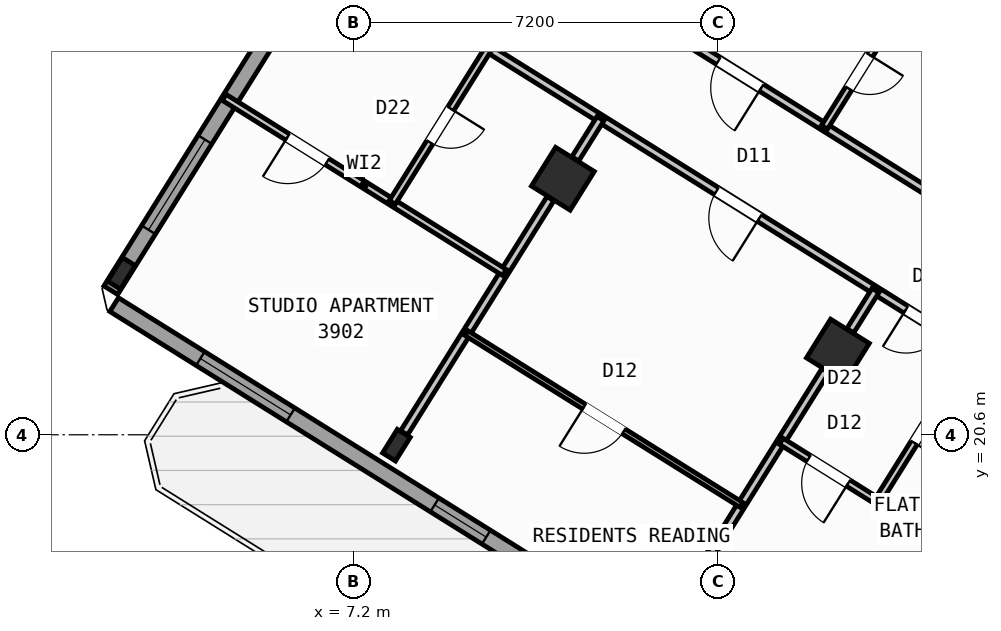
"""IFC4 building model, lengths in metres.
Left out: names, types, materials, properties, quantities, classifications, styles, units other than length and angle.
Written with IfcOpenShell. Run it as: python <this file> out.ifc"""

import sys

from ifc_helpers import new_model, si_unit, direction, frame, frame_2d, origin, origin_2d, place, context, subcontext, project, spatial, rectangle, hollow_rectangle, i_section, extrude, source, transform, mapped, element, fill, save


model = new_model("IFC4")
c1 = context("Model", 3, precision=1e-05, world=origin(), true_north=direction((0.0, 1.0)))
c2 = subcontext(c1, "Body", "Model", "MODEL_VIEW")
j1 = project(units=[si_unit("LENGTHUNIT", "METRE"), si_unit("PLANEANGLEUNIT", "RADIAN")], contexts=[c1])
p1 = place(None, origin())
s1 = spatial("IfcSite", under=j1, at=p1, CompositionType="ELEMENT")
p2 = place(p1, origin())
s2 = spatial("IfcBuilding", under=s1, at=p2, CompositionType="ELEMENT")
p3 = place(p2, frame((0.0, 0.0, 155.1)))
s3 = spatial("IfcBuildingStorey", under=s2, at=p3, CompositionType="ELEMENT", Elevation=155.1)
m1 = source(origin(), c2, "Body", "SweptSolid", [
    extrude(hollow_rectangle(XDim=0.9, YDim=0.9, WallThickness=0.036, at=origin_2d()), origin(), (0.0, 0.0, 1.0), 3.6),
])
for number, where, z_axis, x_axis in (
    (1, (16.764, 22.261, 0.0), (0.0, 0.0, 1.0), (-0.848, 0.53, 0.0)),
    (2, (11.336, 25.653, 0.0), (0.0, 0.0, 1.0), (-0.848, 0.53, 0.0)),
):
    element("IfcColumn", number, at=place(p3, frame(where, z_axis=z_axis, x_axis=x_axis)), inside=s3, PredefinedType="COLUMN", context=c2, shape_type="MappedRepresentation", body=[
        mapped(m1, transform((0.0, 0.0, 0.0), scale=1.0)),
    ])
m2 = source(origin(), c2, "Body", "SweptSolid", [
    extrude(i_section(OverallWidth=0.3, OverallDepth=0.55, WebThickness=0.015, FlangeThickness=0.029, at=origin_2d()), origin(), (0.0, 0.0, 1.0), 3.6),
])
for number, where, z_axis, x_axis in (
    (3, (8.051, 20.395, 0.0), (0.0, 0.0, 1.0), (-0.848, 0.53, 0.0)),
    (4, (2.623, 23.786, 0.0), (0.0, 0.0, 1.0), (-0.848, 0.53, 0.0)),
):
    element("IfcColumn", number, at=place(p3, frame(where, z_axis=z_axis, x_axis=x_axis)), inside=s3, PredefinedType="COLUMN", context=c2, shape_type="MappedRepresentation", body=[
        mapped(m2, transform((0.0, 0.0, 0.0), scale=1.0)),
    ])
p4 = place(p3, frame((29.268, 6.429, 0.0), z_axis=(0.0, 0.0, 1.0), x_axis=(-0.848049971435, 0.529916263149, 0.0)))
e5 = element("IfcWall", 5, at=p4, inside=s3, PredefinedType="STANDARD", context=c2, shape_type="SweptSolid", body=[
    extrude(rectangle(XDim=31.588, YDim=0.32, at=frame_2d((15.794, 0.0))), origin(), (0.0, 0.0, 1.0), 3.35),
])
p5 = place(p4, frame((16.362, 0.0, 0.0)))
e6 = element("IfcOpeningElement", 6, at=p5, cuts=e5, PredefinedType="OPENING", context=c2, shape_type="SweptSolid", body=[
    extrude(rectangle(XDim=1.2, YDim=2.15, at=frame_2d((0.6, 1.075))), frame((0.0, 0.17, 0.0), z_axis=(0.0, -1.0, 0.0), x_axis=(1.0, 0.0, 0.0)), (0.0, 0.0, 1.0), 0.34),
])
p6 = place(p4, frame((2.989, 0.0, 0.8)))
e7 = element("IfcOpeningElement", 7, at=p6, cuts=e5, PredefinedType="OPENING", context=c2, shape_type="SweptSolid", body=[
    extrude(rectangle(XDim=2.1, YDim=1.55, at=frame_2d((1.05, 0.775))), frame((0.0, 0.17, 0.0), z_axis=(0.0, -1.0, 0.0), x_axis=(1.0, 0.0, 0.0)), (0.0, 0.0, 1.0), 0.34),
])
p7 = place(p4, frame((8.359, 0.0, 0.8)))
e8 = element("IfcOpeningElement", 8, at=p7, cuts=e5, PredefinedType="OPENING", context=c2, shape_type="SweptSolid", body=[
    extrude(rectangle(XDim=2.1, YDim=1.55, at=frame_2d((1.05, 0.775))), frame((0.0, 0.17, 0.0), z_axis=(0.0, -1.0, 0.0), x_axis=(1.0, 0.0, 0.0)), (0.0, 0.0, 1.0), 0.34),
])
p8 = place(p4, frame((13.284, 0.0, 0.95)))
e9 = element("IfcOpeningElement", 9, at=p8, cuts=e5, PredefinedType="OPENING", context=c2, shape_type="SweptSolid", body=[
    extrude(rectangle(XDim=1.2, YDim=1.4, at=frame_2d((0.6, 0.7))), frame((0.0, 0.17, 0.0), z_axis=(0.0, -1.0, 0.0), x_axis=(1.0, 0.0, 0.0)), (0.0, 0.0, 1.0), 0.34),
])
p9 = place(p4, frame((20.259, 0.0, 0.95)))
e10 = element("IfcOpeningElement", 10, at=p9, cuts=e5, PredefinedType="OPENING", context=c2, shape_type="SweptSolid", body=[
    extrude(rectangle(XDim=1.2, YDim=1.4, at=frame_2d((0.6, 0.7))), frame((0.0, 0.17, 0.0), z_axis=(0.0, -1.0, 0.0), x_axis=(1.0, 0.0, 0.0)), (0.0, 0.0, 1.0), 0.34),
])
p10 = place(p4, frame((22.929, 0.0, 0.95)))
e11 = element("IfcOpeningElement", 11, at=p10, cuts=e5, PredefinedType="OPENING", context=c2, shape_type="SweptSolid", body=[
    extrude(rectangle(XDim=1.2, YDim=1.4, at=frame_2d((0.6, 0.7))), frame((0.0, 0.17, 0.0), z_axis=(0.0, -1.0, 0.0), x_axis=(1.0, 0.0, 0.0)), (0.0, 0.0, 1.0), 0.34),
])
p11 = place(p4, frame((27.481, 0.0, 0.8)))
e12 = element("IfcOpeningElement", 12, at=p11, cuts=e5, PredefinedType="OPENING", context=c2, shape_type="SweptSolid", body=[
    extrude(rectangle(XDim=2.1, YDim=1.55, at=frame_2d((1.05, 0.775))), frame((0.0, 0.17, 0.0), z_axis=(0.0, -1.0, 0.0), x_axis=(1.0, 0.0, 0.0)), (0.0, 0.0, 1.0), 0.34),
])
p12 = place(p3, frame((2.415, 23.452, 0.0), z_axis=(0.0, 0.0, 1.0), x_axis=(0.52991049553, 0.848053575387, 0.0)))
e13 = element("IfcWall", 13, at=p12, inside=s3, PredefinedType="STANDARD", context=c2, shape_type="SweptSolid", body=[
    extrude(rectangle(XDim=21.587, YDim=0.32, at=frame_2d((10.794, 0.0))), origin(), (0.0, 0.0, 1.0), 2.775),
])
p13 = place(p12, frame((1.406, 0.0, 0.8)))
e14 = element("IfcOpeningElement", 14, at=p13, cuts=e13, PredefinedType="OPENING", context=c2, shape_type="SweptSolid", body=[
    extrude(rectangle(XDim=2.1, YDim=1.55, at=frame_2d((1.05, 0.775))), frame((0.0, 0.17, 0.0), z_axis=(0.0, -1.0, 0.0), x_axis=(1.0, 0.0, 0.0)), (0.0, 0.0, 1.0), 0.34),
])
p14 = place(p12, frame((10.949, 0.0, 1.0)))
e15 = element("IfcOpeningElement", 15, at=p14, cuts=e13, PredefinedType="OPENING", context=c2, shape_type="SweptSolid", body=[
    extrude(rectangle(XDim=0.9, YDim=1.25, at=frame_2d((0.45, 0.625))), frame((0.0, 0.17, 0.0), z_axis=(0.0, -1.0, 0.0), x_axis=(1.0, 0.0, 0.0)), (0.0, 0.0, 1.0), 0.34),
])
p15 = place(p12, frame((15.369, 0.0, 0.85)))
e16 = element("IfcOpeningElement", 16, at=p15, cuts=e13, PredefinedType="OPENING", context=c2, shape_type="SweptSolid", body=[
    extrude(rectangle(XDim=1.5, YDim=1.5, at=frame_2d((0.75, 0.75))), frame((0.0, 0.17, 0.0), z_axis=(0.0, -1.0, 0.0), x_axis=(1.0, 0.0, 0.0)), (0.0, 0.0, 1.0), 0.34),
])
p16 = place(p12, frame((18.219, 0.0, 0.85)))
e17 = element("IfcOpeningElement", 17, at=p16, cuts=e13, PredefinedType="OPENING", context=c2, shape_type="SweptSolid", body=[
    extrude(rectangle(XDim=1.5, YDim=1.5, at=frame_2d((0.75, 0.75))), frame((0.0, 0.17, 0.0), z_axis=(0.0, -1.0, 0.0), x_axis=(1.0, 0.0, 0.0)), (0.0, 0.0, 1.0), 0.34),
])
p17 = place(p3, frame((14.138, 41.825, 0.0), z_axis=(0.0, 0.0, 1.0), x_axis=(0.848046498049, -0.529921821731, 0.0)))
e18 = element("IfcWall", 18, at=p17, inside=s3, PredefinedType="STANDARD", context=c2, shape_type="SweptSolid", body=[
    extrude(rectangle(XDim=31.588, YDim=0.32, at=frame_2d((15.794, 0.0))), origin(), (0.0, 0.0, 1.0), 3.35),
])
p18 = place(p17, frame((9.792, 0.0, 0.0)))
e19 = element("IfcOpeningElement", 19, at=p18, cuts=e18, PredefinedType="OPENING", context=c2, shape_type="SweptSolid", body=[
    extrude(rectangle(XDim=1.05, YDim=2.15, at=frame_2d((0.525, 1.075))), frame((0.0, 0.17, 0.0), z_axis=(0.0, -1.0, 0.0), x_axis=(1.0, 0.0, 0.0)), (0.0, 0.0, 1.0), 0.34),
])
p19 = place(p17, frame((0.791, 0.0, 0.85)))
e20 = element("IfcOpeningElement", 20, at=p19, cuts=e18, PredefinedType="OPENING", context=c2, shape_type="SweptSolid", body=[
    extrude(rectangle(XDim=1.8, YDim=1.5, at=frame_2d((0.9, 0.75))), frame((0.0, 0.17, 0.0), z_axis=(0.0, -1.0, 0.0), x_axis=(1.0, 0.0, 0.0)), (0.0, 0.0, 1.0), 0.34),
])
p20 = place(p17, frame((3.996, 0.0, 0.95)))
e21 = element("IfcOpeningElement", 21, at=p20, cuts=e18, PredefinedType="OPENING", context=c2, shape_type="SweptSolid", body=[
    extrude(rectangle(XDim=1.2, YDim=1.4, at=frame_2d((0.6, 0.7))), frame((0.0, 0.17, 0.0), z_axis=(0.0, -1.0, 0.0), x_axis=(1.0, 0.0, 0.0)), (0.0, 0.0, 1.0), 0.34),
])
p21 = place(p17, frame((13.874, 0.0, 0.85)))
e22 = element("IfcOpeningElement", 22, at=p21, cuts=e18, PredefinedType="OPENING", context=c2, shape_type="SweptSolid", body=[
    extrude(rectangle(XDim=1.5, YDim=1.5, at=frame_2d((0.75, 0.75))), frame((0.0, 0.17, 0.0), z_axis=(0.0, -1.0, 0.0), x_axis=(1.0, 0.0, 0.0)), (0.0, 0.0, 1.0), 0.34),
])
p22 = place(p17, frame((17.104, 0.0, 1.0)))
e23 = element("IfcOpeningElement", 23, at=p22, cuts=e18, PredefinedType="OPENING", context=c2, shape_type="SweptSolid", body=[
    extrude(rectangle(XDim=0.9, YDim=1.25, at=frame_2d((0.45, 0.625))), frame((0.0, 0.17, 0.0), z_axis=(0.0, -1.0, 0.0), x_axis=(1.0, 0.0, 0.0)), (0.0, 0.0, 1.0), 0.34),
])
p23 = place(p17, frame((22.069, 0.0, 1.0)))
e24 = element("IfcOpeningElement", 24, at=p23, cuts=e18, PredefinedType="OPENING", context=c2, shape_type="SweptSolid", body=[
    extrude(rectangle(XDim=0.9, YDim=1.25, at=frame_2d((0.45, 0.625))), frame((0.0, 0.17, 0.0), z_axis=(0.0, -1.0, 0.0), x_axis=(1.0, 0.0, 0.0)), (0.0, 0.0, 1.0), 0.34),
])
p24 = place(p17, frame((27.519, 0.0, 1.0)))
e25 = element("IfcOpeningElement", 25, at=p24, cuts=e18, PredefinedType="OPENING", context=c2, shape_type="SweptSolid", body=[
    extrude(rectangle(XDim=0.9, YDim=1.25, at=frame_2d((0.45, 0.625))), frame((0.0, 0.17, 0.0), z_axis=(0.0, -1.0, 0.0), x_axis=(1.0, 0.0, 0.0)), (0.0, 0.0, 1.0), 0.34),
])
p25 = place(p3, frame((20.719, 21.44, 0.0), z_axis=(0.0, 0.0, 1.0), x_axis=(-0.529906246318, -0.848056230514, 0.0)))
e26 = element("IfcWall", 26, at=p25, inside=s3, PredefinedType="PARTITIONING", context=c2, shape_type="SweptSolid", body=[
    extrude(rectangle(XDim=8.05, YDim=0.16, at=frame_2d((4.025, 0.0))), origin(), (0.0, 0.0, 1.0), 3.34),
])
p26 = place(p3, frame((21.885, 23.306, 0.0), z_axis=(0.0, 0.0, 1.0), x_axis=(-0.848052408131, 0.529912363569, 0.0)))
e27 = element("IfcWall", 27, at=p26, inside=s3, PredefinedType="PARTITIONING", context=c2, shape_type="SweptSolid", body=[
    extrude(rectangle(XDim=16.73, YDim=0.16, at=frame_2d((8.365, 0.0))), origin(), (0.0, 0.0, 1.0), 3.34),
])
p27 = place(p26, frame((1.395, 0.0, 0.0)))
e28 = element("IfcOpeningElement", 28, at=p27, cuts=e27, PredefinedType="OPENING", context=c2, shape_type="SweptSolid", body=[
    extrude(rectangle(XDim=1.0, YDim=2.1, at=frame_2d((0.5, 1.05))), frame((0.0, 0.09, 0.0), z_axis=(0.0, -1.0, 0.0), x_axis=(1.0, 0.0, 0.0)), (0.0, 0.0, 1.0), 0.18),
])
p28 = place(p26, frame((7.82, 0.0, 0.0)))
e29 = element("IfcOpeningElement", 29, at=p28, cuts=e27, PredefinedType="OPENING", context=c2, shape_type="SweptSolid", body=[
    extrude(rectangle(XDim=1.0, YDim=2.1, at=frame_2d((0.5, 1.05))), frame((0.0, 0.09, 0.0), z_axis=(0.0, -1.0, 0.0), x_axis=(1.0, 0.0, 0.0)), (0.0, 0.0, 1.0), 0.18),
])
p29 = place(p26, frame((11.14, 0.0, 0.0)))
e30 = element("IfcOpeningElement", 30, at=p29, cuts=e27, PredefinedType="OPENING", context=c2, shape_type="SweptSolid", body=[
    extrude(rectangle(XDim=1.0, YDim=2.1, at=frame_2d((0.5, 1.05))), frame((0.0, 0.09, 0.0), z_axis=(0.0, -1.0, 0.0), x_axis=(1.0, 0.0, 0.0)), (0.0, 0.0, 1.0), 0.18),
])
p30 = place(p3, frame((20.719, 21.44, 0.0), z_axis=(0.0, 0.0, 1.0), x_axis=(-0.848048310262, 0.529918921593, 0.0)))
e31 = element("IfcWall", 31, at=p30, inside=s3, PredefinedType="PARTITIONING", context=c2, shape_type="SweptSolid", body=[
    extrude(rectangle(XDim=16.73, YDim=0.16, at=frame_2d((8.365, 0.0))), origin(), (0.0, 0.0, 1.0), 3.34),
])
p31 = place(p30, frame((2.22, 0.0, 0.0)))
e32 = element("IfcOpeningElement", 32, at=p31, cuts=e31, PredefinedType="OPENING", context=c2, shape_type="SweptSolid", body=[
    extrude(rectangle(XDim=0.86, YDim=2.05, at=frame_2d((0.43, 1.025))), frame((0.0, 0.09, 0.0), z_axis=(0.0, -1.0, 0.0), x_axis=(1.0, 0.0, 0.0)), (0.0, 0.0, 1.0), 0.18),
])
p32 = place(p30, frame((6.49, 0.0, 0.0)))
e33 = element("IfcOpeningElement", 33, at=p32, cuts=e31, PredefinedType="OPENING", context=c2, shape_type="SweptSolid", body=[
    extrude(rectangle(XDim=1.0, YDim=2.1, at=frame_2d((0.5, 1.05))), frame((0.0, 0.09, 0.0), z_axis=(0.0, -1.0, 0.0), x_axis=(1.0, 0.0, 0.0)), (0.0, 0.0, 1.0), 0.18),
])
p33 = place(p30, frame((14.304, 0.0, 0.0)))
e34 = element("IfcOpeningElement", 34, at=p33, cuts=e31, PredefinedType="OPENING", context=c2, shape_type="SweptSolid", body=[
    extrude(rectangle(XDim=1.0, YDim=2.1, at=frame_2d((0.5, 1.05))), frame((0.0, 0.09, 0.0), z_axis=(0.0, -1.0, 0.0), x_axis=(1.0, 0.0, 0.0)), (0.0, 0.0, 1.0), 0.18),
])
p34 = place(p3, frame((17.506, 23.449, 0.0), z_axis=(0.0, 0.0, 1.0), x_axis=(-0.529835187763, -0.848100627171, 0.0)))
e35 = element("IfcWall", 35, at=p34, inside=s3, PredefinedType="PARTITIONING", context=c2, shape_type="SweptSolid", body=[
    extrude(rectangle(XDim=0.938, YDim=0.16, at=frame_2d((0.469, 0.0))), origin(), (0.0, 0.0, 1.0), 2.775),
])
p35 = place(p3, frame((16.519, 21.87, 0.0), z_axis=(0.0, 0.0, 1.0), x_axis=(-0.529922447305, -0.848046107144, 0.0)))
e36 = element("IfcWall", 36, at=p35, inside=s3, PredefinedType="PARTITIONING", context=c2, shape_type="SweptSolid", body=[
    extrude(rectangle(XDim=5.451, YDim=0.16, at=frame_2d((2.726, 0.0))), origin(), (0.0, 0.0, 1.0), 2.775),
])
p36 = place(p3, frame((18.86, 18.464, 0.0), z_axis=(0.0, 0.0, 1.0), x_axis=(-0.848059820872, 0.529900500304, 0.0)))
e37 = element("IfcWall", 37, at=p36, inside=s3, PredefinedType="PLUMBINGWALL", context=c2, shape_type="SweptSolid", body=[
    extrude(rectangle(XDim=3.79, YDim=0.14, at=frame_2d((1.895, 0.0))), origin(), (0.0, 0.0, 1.0), 3.34),
])
p37 = place(p36, frame((2.23, 0.0, 0.0)))
e38 = element("IfcOpeningElement", 38, at=p37, cuts=e37, PredefinedType="OPENING", context=c2, shape_type="SweptSolid", body=[
    extrude(rectangle(XDim=0.92, YDim=2.08, at=frame_2d((0.46, 1.04))), frame((0.0, 0.08, 0.0), z_axis=(0.0, -1.0, 0.0), x_axis=(1.0, 0.0, 0.0)), (0.0, 0.0, 1.0), 0.16),
])
p38 = place(p3, frame((19.405, 22.261, 0.0), z_axis=(0.0, 0.0, 1.0), x_axis=(-0.529898896701, -0.848060822863, 0.0)))
e39 = element("IfcWall", 39, at=p38, inside=s3, PredefinedType="PLUMBINGWALL", context=c2, shape_type="SweptSolid", body=[
    extrude(rectangle(XDim=3.51, YDim=0.14, at=frame_2d((1.755, 0.0))), origin(), (0.0, 0.0, 1.0), 2.995),
])
p39 = place(p38, frame((1.365, 0.0, 0.0)))
e40 = element("IfcOpeningElement", 40, at=p39, cuts=e39, PredefinedType="OPENING", context=c2, shape_type="SweptSolid", body=[
    extrude(rectangle(XDim=0.78, YDim=2.05, at=frame_2d((0.39, 1.025))), frame((0.0, 0.08, 0.0), z_axis=(0.0, -1.0, 0.0), x_axis=(1.0, 0.0, 0.0)), (0.0, 0.0, 1.0), 0.16),
])
p40 = place(p3, frame((12.078, 26.84, 0.0), z_axis=(0.0, 0.0, 1.0), x_axis=(-0.529952145338, -0.848027548876, 0.0)))
e41 = element("IfcWall", 41, at=p40, inside=s3, PredefinedType="PARTITIONING", context=c2, shape_type="SweptSolid", body=[
    extrude(rectangle(XDim=0.938, YDim=0.16, at=frame_2d((0.469, 0.0))), origin(), (0.0, 0.0, 1.0), 2.775),
])
p41 = place(p3, frame((11.091, 25.261, 0.0), z_axis=(0.0, 0.0, 1.0), x_axis=(-0.52994257524, -0.848033529377, 0.0)))
e42 = element("IfcWall", 42, at=p41, inside=s3, PredefinedType="PARTITIONING", context=c2, shape_type="SweptSolid", body=[
    extrude(rectangle(XDim=5.451, YDim=0.16, at=frame_2d((2.726, 0.0))), origin(), (0.0, 0.0, 1.0), 2.775),
])
p42 = place(p3, frame((14.86, 19.215, 0.0), z_axis=(0.0, 0.0, 1.0), x_axis=(-0.848039019877, 0.529933789039, 0.0)))
e43 = element("IfcWall", 43, at=p42, inside=s3, PredefinedType="PARTITIONING", context=c2, shape_type="SweptSolid", body=[
    extrude(rectangle(XDim=6.4, YDim=0.11, at=frame_2d((3.2, 0.0))), origin(), (0.0, 0.0, 1.0), 3.34),
])
p43 = place(p42, frame((2.74, 0.0, 0.0)))
e44 = element("IfcOpeningElement", 44, at=p43, cuts=e43, PredefinedType="OPENING", context=c2, shape_type="SweptSolid", body=[
    extrude(rectangle(XDim=0.92, YDim=2.08, at=frame_2d((0.46, 1.04))), frame((0.0, 0.065, 0.0), z_axis=(0.0, -1.0, 0.0), x_axis=(1.0, 0.0, 0.0)), (0.0, 0.0, 1.0), 0.13),
])
p44 = place(p3, frame((10.181, 23.804, 0.0), z_axis=(0.0, 0.0, 1.0), x_axis=(-0.848065614912, 0.529891227332, 0.0)))
e45 = element("IfcWall", 45, at=p44, inside=s3, PredefinedType="PLUMBINGWALL", context=c2, shape_type="SweptSolid", body=[
    extrude(rectangle(XDim=6.52, YDim=0.14, at=frame_2d((3.26, 0.0))), origin(), (0.0, 0.0, 1.0), 3.34),
])
p45 = place(p44, frame((4.124, 0.0, 0.0)))
e46 = element("IfcOpeningElement", 46, at=p45, cuts=e45, PredefinedType="OPENING", context=c2, shape_type="SweptSolid", body=[
    extrude(rectangle(XDim=0.92, YDim=2.08, at=frame_2d((0.46, 1.04))), frame((0.0, 0.08, 0.0), z_axis=(0.0, -1.0, 0.0), x_axis=(1.0, 0.0, 0.0)), (0.0, 0.0, 1.0), 0.16),
])
p46 = place(p3, frame((9.866, 28.222, 0.0), z_axis=(0.0, 0.0, 1.0), x_axis=(-0.529876336437, -0.84807491891, 0.0)))
e47 = element("IfcWall", 47, at=p46, inside=s3, PredefinedType="PLUMBINGWALL", context=c2, shape_type="SweptSolid", body=[
    extrude(rectangle(XDim=3.58, YDim=0.14, at=frame_2d((1.79, 0.0))), origin(), (0.0, 0.0, 1.0), 3.34),
])
p47 = place(p46, frame((1.4, 0.0, 0.0)))
e48 = element("IfcOpeningElement", 48, at=p47, cuts=e47, PredefinedType="OPENING", context=c2, shape_type="SweptSolid", body=[
    extrude(rectangle(XDim=0.78, YDim=2.05, at=frame_2d((0.39, 1.025))), frame((0.0, 0.08, 0.0), z_axis=(0.0, -1.0, 0.0), x_axis=(1.0, 0.0, 0.0)), (0.0, 0.0, 1.0), 0.16),
])
p48 = place(p3, frame((20.039, 27.502, 0.0), z_axis=(0.0, 0.0, 1.0), x_axis=(-0.848039019877, 0.529933789039, 0.0)))
e49 = element("IfcWall", 49, at=p48, inside=s3, PredefinedType="PLUMBINGWALL", context=c2, shape_type="SweptSolid", body=[
    extrude(rectangle(XDim=6.4, YDim=0.14, at=frame_2d((3.2, 0.0))), origin(), (0.0, 0.0, 1.0), 3.34),
])
p49 = place(p48, frame((2.824, 0.0, 0.0)))
e50 = element("IfcOpeningElement", 50, at=p49, cuts=e49, PredefinedType="OPENING", context=c2, shape_type="SweptSolid", body=[
    extrude(rectangle(XDim=0.78, YDim=2.05, at=frame_2d((0.39, 1.025))), frame((0.0, 0.08, 0.0), z_axis=(0.0, -1.0, 0.0), x_axis=(1.0, 0.0, 0.0)), (0.0, 0.0, 1.0), 0.16),
])
p50 = place(p3, frame((17.867, 28.859, 0.0), z_axis=(0.0, 0.0, 1.0), x_axis=(-0.529913878929, -0.848051461244, 0.0)))
e51 = element("IfcWall", 51, at=p50, inside=s3, PredefinedType="PLUMBINGWALL", context=c2, shape_type="SweptSolid", body=[
    extrude(rectangle(XDim=2.58, YDim=0.14, at=frame_2d((1.29, 0.0))), origin(), (0.0, 0.0, 1.0), 3.34),
])
p51 = place(p50, frame((0.9, 0.0, 0.0)))
e52 = element("IfcOpeningElement", 52, at=p51, cuts=e51, PredefinedType="OPENING", context=c2, shape_type="SweptSolid", body=[
    extrude(rectangle(XDim=0.78, YDim=2.05, at=frame_2d((0.39, 1.025))), frame((0.0, 0.08, 0.0), z_axis=(0.0, -1.0, 0.0), x_axis=(1.0, 0.0, 0.0)), (0.0, 0.0, 1.0), 0.16),
])
m3 = source(origin(), c2, "Body", "SweptSolid", [
    extrude(rectangle(XDim=1.2, YDim=1.4, at=frame_2d((0.6, 0.7))), frame((0.0, 0.03, 0.0), z_axis=(0.0, -1.0, 0.0), x_axis=(1.0, 0.0, 0.0)), (0.0, 0.0, 1.0), 0.06),
])
p52 = place(p10, origin())
e53 = element("IfcWindow", 53, at=p52, inside=s3, PartitioningType="SINGLE_PANEL", PredefinedType="WINDOW", context=c2, shape_type="MappedRepresentation", body=[
    mapped(m3, transform((0.0, 0.0, 0.0), scale=1.0)),
])
fill(e11, e53)
m4 = source(origin(), c2, "Body", "SweptSolid", [
    extrude(rectangle(XDim=2.1, YDim=1.55, at=frame_2d((1.05, 0.775))), frame((0.0, 0.03, 0.0), z_axis=(0.0, -1.0, 0.0), x_axis=(1.0, 0.0, 0.0)), (0.0, 0.0, 1.0), 0.06),
])
p53 = place(p11, origin())
e54 = element("IfcWindow", 54, at=p53, inside=s3, PartitioningType="SINGLE_PANEL", PredefinedType="WINDOW", context=c2, shape_type="MappedRepresentation", body=[
    mapped(m4, transform((0.0, 0.0, 0.0), scale=1.0)),
])
fill(e12, e54)
p54 = place(p13, origin())
e55 = element("IfcWindow", 55, at=p54, inside=s3, PartitioningType="SINGLE_PANEL", PredefinedType="WINDOW", context=c2, shape_type="MappedRepresentation", body=[
    mapped(m4, transform((0.0, 0.0, 0.0), scale=1.0)),
])
fill(e14, e55)
m5 = source(origin(), c2, "Body", "SweptSolid", [
    extrude(rectangle(XDim=0.86, YDim=2.05, at=frame_2d((0.43, 1.025))), frame((0.0, 0.025, 0.0), z_axis=(0.0, -1.0, 0.0), x_axis=(1.0, 0.0, 0.0)), (0.0, 0.0, 1.0), 0.05),
])
p55 = place(p31, origin())
e56 = element("IfcDoor", 56, at=p55, inside=s3, OperationType="SINGLE_SWING_RIGHT", PredefinedType="DOOR", context=c2, shape_type="MappedRepresentation", body=[
    mapped(m5, transform((0.0, 0.0, 0.0), scale=1.0)),
])
fill(e32, e56)
m6 = source(origin(), c2, "Body", "SweptSolid", [
    extrude(rectangle(XDim=0.92, YDim=2.08, at=frame_2d((0.46, 1.04))), frame((0.0, 0.025, 0.0), z_axis=(0.0, -1.0, 0.0), x_axis=(1.0, 0.0, 0.0)), (0.0, 0.0, 1.0), 0.05),
])
p56 = place(p37, origin())
e57 = element("IfcDoor", 57, at=p56, inside=s3, OperationType="SINGLE_SWING_LEFT", PredefinedType="DOOR", context=c2, shape_type="MappedRepresentation", body=[
    mapped(m6, transform((0.0, 0.0, 0.0), scale=1.0)),
])
fill(e38, e57)
m7 = source(origin(), c2, "Body", "SweptSolid", [
    extrude(rectangle(XDim=0.78, YDim=2.05, at=frame_2d((0.39, 1.025))), frame((0.0, 0.025, 0.0), z_axis=(0.0, -1.0, 0.0), x_axis=(1.0, 0.0, 0.0)), (0.0, 0.0, 1.0), 0.05),
])
p57 = place(p39, origin())
e58 = element("IfcDoor", 58, at=p57, inside=s3, OperationType="SINGLE_SWING_RIGHT", PredefinedType="DOOR", context=c2, shape_type="MappedRepresentation", body=[
    mapped(m7, transform((0.0, 0.0, 0.0), scale=1.0)),
])
fill(e40, e58)
m8 = source(origin(), c2, "Body", "SweptSolid", [
    extrude(rectangle(XDim=1.0, YDim=2.1, at=frame_2d((0.5, 1.05))), frame((0.0, 0.025, 0.0), z_axis=(0.0, -1.0, 0.0), x_axis=(1.0, 0.0, 0.0)), (0.0, 0.0, 1.0), 0.05),
])
p58 = place(p32, origin())
e59 = element("IfcDoor", 59, at=p58, inside=s3, OperationType="SINGLE_SWING_LEFT", PredefinedType="DOOR", context=c2, shape_type="MappedRepresentation", body=[
    mapped(m8, transform((0.0, 0.0, 0.0), scale=1.0)),
])
fill(e33, e59)
p59 = place(p43, origin())
e60 = element("IfcDoor", 60, at=p59, inside=s3, OperationType="SINGLE_SWING_RIGHT", PredefinedType="DOOR", context=c2, shape_type="MappedRepresentation", body=[
    mapped(m6, transform((0.0, 0.0, 0.0), scale=1.0)),
])
fill(e44, e60)
p60 = place(p45, origin())
e61 = element("IfcDoor", 61, at=p60, inside=s3, OperationType="SINGLE_SWING_RIGHT", PredefinedType="DOOR", context=c2, shape_type="MappedRepresentation", body=[
    mapped(m6, transform((0.0, 0.0, 0.0), scale=1.0)),
])
fill(e46, e61)
p61 = place(p47, origin())
e62 = element("IfcDoor", 62, at=p61, inside=s3, OperationType="SINGLE_SWING_LEFT", PredefinedType="DOOR", context=c2, shape_type="MappedRepresentation", body=[
    mapped(m7, transform((0.0, 0.0, 0.0), scale=1.0)),
])
fill(e48, e62)
p62 = place(p28, origin())
e63 = element("IfcDoor", 63, at=p62, inside=s3, OperationType="SINGLE_SWING_LEFT", PredefinedType="DOOR", context=c2, shape_type="MappedRepresentation", body=[
    mapped(m8, transform((0.0, 0.0, 0.0), scale=1.0)),
])
fill(e29, e63)
p63 = place(p51, origin())
e64 = element("IfcDoor", 64, at=p63, inside=s3, OperationType="SINGLE_SWING_LEFT", PredefinedType="DOOR", context=c2, shape_type="MappedRepresentation", body=[
    mapped(m7, transform((0.0, 0.0, 0.0), scale=1.0)),
])
fill(e52, e64)
save(model, sys.argv[1])
